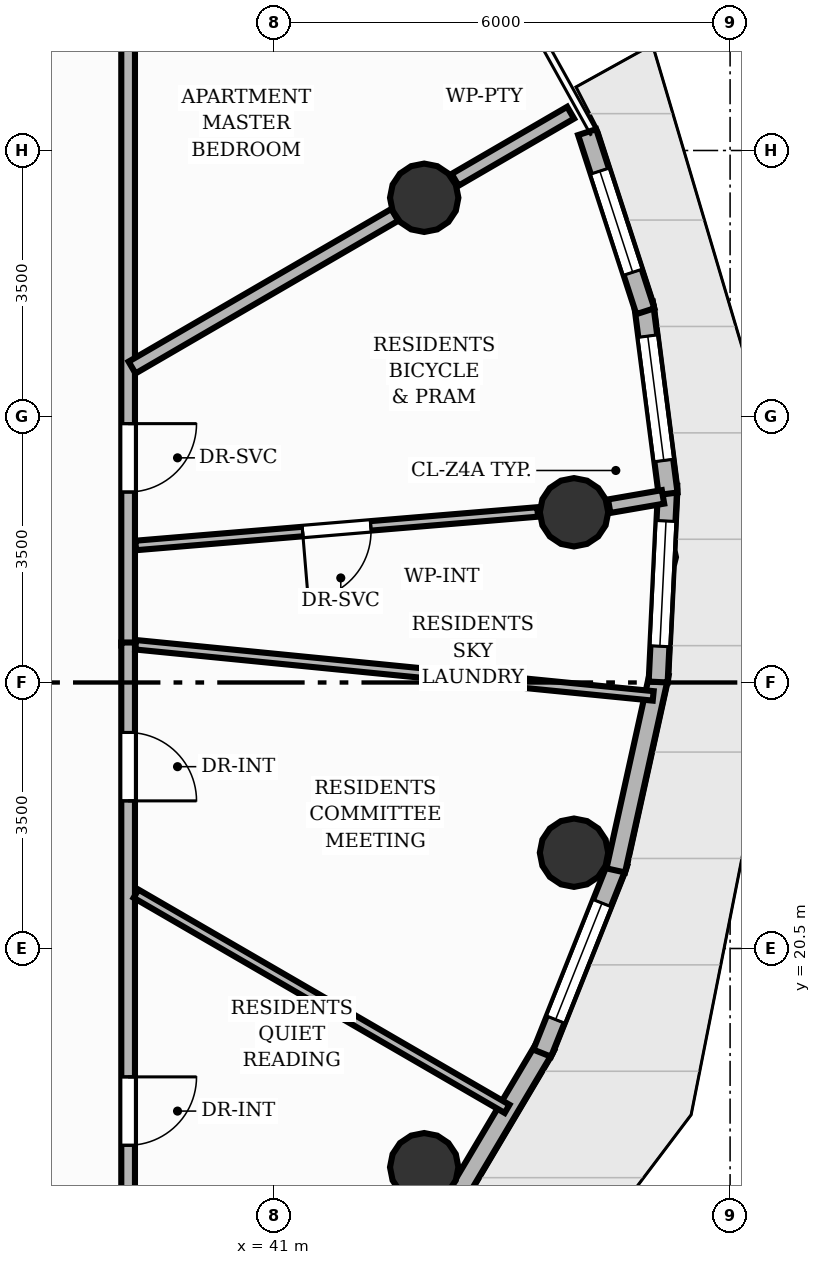
"""IFC4 building model, lengths in metres.
Left out: names, types, materials, properties, quantities, classifications, styles, units other than length and angle.
Written with IfcOpenShell. Run it as: python <this file> out.ifc"""

import sys

from ifc_helpers import new_model, si_unit, direction, frame, frame_2d, origin, origin_2d, place, context, subcontext, project, spatial, rectangle, circle, extrude, element, fill, save


model = new_model("IFC4")
c1 = context("Model", 3, precision=1e-05, world=origin(), true_north=direction((0.0, 1.0)))
c2 = subcontext(c1, "Body", "Model", "MODEL_VIEW")
j1 = project(units=[si_unit("LENGTHUNIT", "METRE"), si_unit("PLANEANGLEUNIT", "RADIAN")], contexts=[c1])
p1 = place(None, origin())
s1 = spatial("IfcSite", under=j1, at=p1, CompositionType="ELEMENT")
p2 = place(p1, origin())
s2 = spatial("IfcBuilding", under=s1, at=p2, CompositionType="ELEMENT")
p3 = place(p2, frame((0.0, 0.0, 188.64)))
s3 = spatial("IfcBuildingStorey", under=s2, at=p3, CompositionType="ELEMENT", Elevation=188.64)
for number, where, z_axis, x_axis in (
    (1, (44.946, 26.24, 0.0), (0.0, 0.0, 1.0), (1.0, 0.0, 0.0)),
    (2, (42.975, 30.378, 0.0), (0.0, 0.0, 1.0), (1.0, 0.0, 0.0)),
    (3, (42.975, 17.622, 0.0), (0.0, 0.0, 1.0), (1.0, 0.0, 0.0)),
    (4, (44.946, 21.76, 0.0), (0.0, 0.0, 1.0), (1.0, 0.0, 0.0)),
):
    element("IfcColumn", number, at=place(p3, frame(where, z_axis=z_axis, x_axis=x_axis)), inside=s3, PredefinedType="COLUMN", context=c2, shape_type="SweptSolid", body=[
        extrude(circle(Radius=0.45, at=origin_2d()), origin(), (0.0, 0.0, 1.0), 3.2),
    ])
p4 = place(p3, frame((44.576, 19.221, 0.0), z_axis=(0.0, 0.0, 1.0), x_axis=(-0.510320389621, -0.859984360287, 0.0)))
e5 = element("IfcWall", 5, at=p4, inside=s3, PredefinedType="SOLIDWALL", context=c2, shape_type="SweptSolid", body=[
    extrude(rectangle(XDim=2.738, YDim=0.25, at=frame_2d((1.369, 0.0))), origin(), (0.0, 0.0, 1.0), 2.96),
])
p5 = place(p3, frame((45.528, 21.633, 0.0), z_axis=(0.0, 0.0, 1.0), x_axis=(-0.370330939431, -0.928899884433, 0.0)))
e6 = element("IfcWall", 6, at=p5, inside=s3, PredefinedType="SOLIDWALL", context=c2, shape_type="SweptSolid", body=[
    extrude(rectangle(XDim=2.702, YDim=0.25, at=frame_2d((1.351, 0.0))), origin(), (0.0, 0.0, 1.0), 2.96),
])
p6 = place(p5, frame((0.576, 0.0, 0.85)))
e7 = element("IfcOpeningElement", 7, at=p6, cuts=e6, PredefinedType="OPENING", context=c2, shape_type="SweptSolid", body=[
    extrude(rectangle(XDim=1.65, YDim=1.55, at=frame_2d((0.825, 0.775))), frame((0.0, 0.135, 0.0), z_axis=(0.0, -1.0, 0.0), x_axis=(1.0, 0.0, 0.0)), (0.0, 0.0, 1.0), 0.27),
])
p7 = place(p3, frame((46.068, 24.116, 0.0), z_axis=(0.0, 0.0, 1.0), x_axis=(-0.215877166516, -0.976420528756, 0.0)))
e8 = element("IfcWall", 8, at=p7, inside=s3, PredefinedType="SOLIDWALL", context=c2, shape_type="SweptSolid", body=[
    extrude(rectangle(XDim=2.651, YDim=0.25, at=frame_2d((1.325, 0.0))), origin(), (0.0, 0.0, 1.0), 2.96),
])
p8 = place(p3, frame((46.18, 26.595, 0.0), z_axis=(0.0, 0.0, 1.0), x_axis=(-0.048688181414, -0.99881402723, 0.0)))
e9 = element("IfcWall", 9, at=p8, inside=s3, PredefinedType="SOLIDWALL", context=c2, shape_type="SweptSolid", body=[
    extrude(rectangle(XDim=2.593, YDim=0.25, at=frame_2d((1.296, 0.0))), origin(), (0.0, 0.0, 1.0), 2.96),
])
p9 = place(p8, frame((0.471, 0.0, 0.85)))
e10 = element("IfcOpeningElement", 10, at=p9, cuts=e9, PredefinedType="OPENING", context=c2, shape_type="SweptSolid", body=[
    extrude(rectangle(XDim=1.65, YDim=1.55, at=frame_2d((0.825, 0.775))), frame((0.0, 0.135, 0.0), z_axis=(0.0, -1.0, 0.0), x_axis=(1.0, 0.0, 0.0)), (0.0, 0.0, 1.0), 0.27),
])
p10 = place(p3, frame((45.86, 28.995, 0.0), z_axis=(0.0, 0.0, 1.0), x_axis=(0.128057007482, -0.991766808698, 0.0)))
e11 = element("IfcWall", 11, at=p10, inside=s3, PredefinedType="SOLIDWALL", context=c2, shape_type="SweptSolid", body=[
    extrude(rectangle(XDim=2.532, YDim=0.25, at=frame_2d((1.266, 0.0))), origin(), (0.0, 0.0, 1.0), 2.96),
])
p11 = place(p10, frame((0.441, 0.0, 0.85)))
e12 = element("IfcOpeningElement", 12, at=p11, cuts=e11, PredefinedType="OPENING", context=c2, shape_type="SweptSolid", body=[
    extrude(rectangle(XDim=1.65, YDim=1.55, at=frame_2d((0.825, 0.775))), frame((0.0, 0.135, 0.0), z_axis=(0.0, -1.0, 0.0), x_axis=(1.0, 0.0, 0.0)), (0.0, 0.0, 1.0), 0.27),
])
p12 = place(p3, frame((45.119, 31.241, 0.0), z_axis=(0.0, 0.0, 1.0), x_axis=(0.309005861828, -0.951060133407, 0.0)))
e13 = element("IfcWall", 13, at=p12, inside=s3, PredefinedType="SOLIDWALL", context=c2, shape_type="SweptSolid", body=[
    extrude(rectangle(XDim=2.478, YDim=0.25, at=frame_2d((1.239, 0.0))), origin(), (0.0, 0.0, 1.0), 2.96),
])
p13 = place(p12, frame((0.539, 0.0, 0.85)))
e14 = element("IfcOpeningElement", 14, at=p13, cuts=e13, PredefinedType="OPENING", context=c2, shape_type="SweptSolid", body=[
    extrude(rectangle(XDim=1.4, YDim=1.55, at=frame_2d((0.7, 0.775))), frame((0.0, 0.135, 0.0), z_axis=(0.0, -1.0, 0.0), x_axis=(1.0, 0.0, 0.0)), (0.0, 0.0, 1.0), 0.27),
])
p14 = place(p3, frame((45.409, 26.32, 0.0), z_axis=(0.0, 0.0, 1.0), x_axis=(0.985336223431, 0.170623933826, 0.0)))
e15 = element("IfcWall", 15, at=p14, inside=s3, PredefinedType="PARTITIONING", context=c2, shape_type="SweptSolid", body=[
    extrude(rectangle(XDim=0.718, YDim=0.18, at=frame_2d((0.359, 0.0))), origin(), (0.0, 0.0, 1.0), 2.404),
])
p15 = place(p3, frame((43.382, 30.614, 0.0), z_axis=(0.0, 0.0, 1.0), x_axis=(0.86461381872, 0.502437005482, 0.0)))
e16 = element("IfcWall", 16, at=p15, inside=s3, PredefinedType="PARTITIONING", context=c2, shape_type="SweptSolid", body=[
    extrude(rectangle(XDim=1.758, YDim=0.18, at=frame_2d((0.879, 0.0))), origin(), (0.0, 0.0, 1.0), 2.404),
])
p16 = place(p3, frame((39.08, 32.58, 0.0), z_axis=(0.0, 0.0, 1.0), x_axis=(0.0, -1.0, 0.0)))
e17 = element("IfcWall", 17, at=p16, inside=s3, PredefinedType="PARTITIONING", context=c2, shape_type="SweptSolid", body=[
    extrude(rectangle(XDim=8.094, YDim=0.18, at=frame_2d((4.047, 0.0))), origin(), (0.0, 0.0, 1.0), 2.955),
])
p17 = place(p16, frame((5.174, 0.0, 0.0)))
e18 = element("IfcOpeningElement", 18, at=p17, cuts=e17, PredefinedType="OPENING", context=c2, shape_type="SweptSolid", body=[
    extrude(rectangle(XDim=0.9, YDim=2.1, at=frame_2d((0.45, 1.05))), frame((0.0, 0.1, 0.0), z_axis=(0.0, -1.0, 0.0), x_axis=(1.0, 0.0, 0.0)), (0.0, 0.0, 1.0), 0.2),
])
p18 = place(p3, frame((39.08, 24.526, 0.0), z_axis=(0.0, 0.0, 1.0), x_axis=(0.0, -1.0, 0.0)))
e19 = element("IfcWall", 19, at=p18, inside=s3, PredefinedType="PARTITIONING", context=c2, shape_type="SweptSolid", body=[
    extrude(rectangle(XDim=9.106, YDim=0.18, at=frame_2d((4.553, 0.0))), origin(), (0.0, 0.0, 1.0), 2.955),
])
p19 = place(p18, frame((1.184, 0.0, 0.0)))
e20 = element("IfcOpeningElement", 20, at=p19, cuts=e19, PredefinedType="OPENING", context=c2, shape_type="SweptSolid", body=[
    extrude(rectangle(XDim=0.9, YDim=2.1, at=frame_2d((0.45, 1.05))), frame((0.0, 0.1, 0.0), z_axis=(0.0, -1.0, 0.0), x_axis=(1.0, 0.0, 0.0)), (0.0, 0.0, 1.0), 0.2),
])
p20 = place(p18, frame((5.716, 0.0, 0.0)))
e21 = element("IfcOpeningElement", 21, at=p20, cuts=e19, PredefinedType="OPENING", context=c2, shape_type="SweptSolid", body=[
    extrude(rectangle(XDim=0.9, YDim=2.1, at=frame_2d((0.45, 1.05))), frame((0.0, 0.1, 0.0), z_axis=(0.0, -1.0, 0.0), x_axis=(1.0, 0.0, 0.0)), (0.0, 0.0, 1.0), 0.2),
])
p21 = place(p3, frame((44.468, 26.244, 0.0), z_axis=(0.0, 0.0, 1.0), x_axis=(-0.996538774807, -0.083129238578, 0.0)))
e22 = element("IfcWall", 22, at=p21, inside=s3, PredefinedType="PARTITIONING", context=c2, shape_type="SweptSolid", body=[
    extrude(rectangle(XDim=5.307, YDim=0.125, at=frame_2d((2.653, 0.0))), origin(), (0.0, 0.0, 1.0), 2.404),
])
p22 = place(p21, frame((2.204, 0.0, 0.0)))
e23 = element("IfcOpeningElement", 23, at=p22, cuts=e22, PredefinedType="OPENING", context=c2, shape_type="SweptSolid", body=[
    extrude(rectangle(XDim=0.9, YDim=2.1, at=frame_2d((0.45, 1.05))), frame((0.0, 0.073, 0.0), z_axis=(0.0, -1.0, 0.0), x_axis=(1.0, 0.0, 0.0)), (0.0, 0.0, 1.0), 0.145),
])
p23 = place(p3, frame((39.132, 28.144, 0.0), z_axis=(0.0, 0.0, 1.0), x_axis=(0.864597268714, 0.502465484319, 0.0)))
e24 = element("IfcWall", 24, at=p23, inside=s3, PredefinedType="PARTITIONING", context=c2, shape_type="SweptSolid", body=[
    extrude(rectangle(XDim=3.998, YDim=0.18, at=frame_2d((1.999, 0.0))), origin(), (0.0, 0.0, 1.0), 2.404),
])
p24 = place(p3, frame((44.066, 18.39, 0.0), z_axis=(0.0, 0.0, 1.0), x_axis=(-0.865092390625, 0.501612555348, 0.0)))
e25 = element("IfcWall", 25, at=p24, inside=s3, PredefinedType="PARTITIONING", context=c2, shape_type="SweptSolid", body=[
    extrude(rectangle(XDim=5.643, YDim=0.125, at=frame_2d((2.822, 0.0))), origin(), (0.0, 0.0, 1.0), 2.692),
])
p25 = place(p3, frame((39.179, 24.497, 0.0), z_axis=(0.0, 0.0, 1.0), x_axis=(0.995152744832, -0.098341316102, 0.0)))
e26 = element("IfcWall", 26, at=p25, inside=s3, PredefinedType="PARTITIONING", context=c2, shape_type="SweptSolid", body=[
    extrude(rectangle(XDim=6.842, YDim=0.125, at=frame_2d((3.421, 0.0))), origin(), (0.0, 0.0, 1.0), 2.692),
])
p26 = place(p6, origin())
e27 = element("IfcWindow", 27, at=p26, inside=s3, PartitioningType="SINGLE_PANEL", PredefinedType="WINDOW", context=c2, shape_type="SweptSolid", body=[
    extrude(rectangle(XDim=1.65, YDim=1.55, at=frame_2d((0.825, 0.775))), frame((0.0, 0.03, 0.0), z_axis=(0.0, -1.0, 0.0), x_axis=(1.0, 0.0, 0.0)), (0.0, 0.0, 1.0), 0.06),
])
fill(e7, e27)
p27 = place(p9, origin())
e28 = element("IfcWindow", 28, at=p27, inside=s3, PartitioningType="SINGLE_PANEL", PredefinedType="WINDOW", context=c2, shape_type="SweptSolid", body=[
    extrude(rectangle(XDim=1.65, YDim=1.55, at=frame_2d((0.825, 0.775))), frame((0.0, 0.03, 0.0), z_axis=(0.0, -1.0, 0.0), x_axis=(1.0, 0.0, 0.0)), (0.0, 0.0, 1.0), 0.06),
])
fill(e10, e28)
p28 = place(p11, origin())
e29 = element("IfcWindow", 29, at=p28, inside=s3, PartitioningType="SINGLE_PANEL", PredefinedType="WINDOW", context=c2, shape_type="SweptSolid", body=[
    extrude(rectangle(XDim=1.65, YDim=1.55, at=frame_2d((0.825, 0.775))), frame((0.0, 0.03, 0.0), z_axis=(0.0, -1.0, 0.0), x_axis=(1.0, 0.0, 0.0)), (0.0, 0.0, 1.0), 0.06),
])
fill(e12, e29)
p29 = place(p13, origin())
e30 = element("IfcWindow", 30, at=p29, inside=s3, PartitioningType="SINGLE_PANEL", PredefinedType="WINDOW", context=c2, shape_type="SweptSolid", body=[
    extrude(rectangle(XDim=1.4, YDim=1.55, at=frame_2d((0.7, 0.775))), frame((0.0, 0.03, 0.0), z_axis=(0.0, -1.0, 0.0), x_axis=(1.0, 0.0, 0.0)), (0.0, 0.0, 1.0), 0.06),
])
fill(e14, e30)
p30 = place(p17, origin())
e31 = element("IfcDoor", 31, at=p30, inside=s3, OperationType="SINGLE_SWING_LEFT", PredefinedType="DOOR", context=c2, shape_type="SweptSolid", body=[
    extrude(rectangle(XDim=0.9, YDim=2.1, at=frame_2d((0.45, 1.05))), frame((0.0, 0.025, 0.0), z_axis=(0.0, -1.0, 0.0), x_axis=(1.0, 0.0, 0.0)), (0.0, 0.0, 1.0), 0.05),
])
fill(e18, e31)
p31 = place(p19, origin())
e32 = element("IfcDoor", 32, at=p31, inside=s3, OperationType="SINGLE_SWING_RIGHT", PredefinedType="DOOR", context=c2, shape_type="SweptSolid", body=[
    extrude(rectangle(XDim=0.9, YDim=2.1, at=frame_2d((0.45, 1.05))), frame((0.0, 0.025, 0.0), z_axis=(0.0, -1.0, 0.0), x_axis=(1.0, 0.0, 0.0)), (0.0, 0.0, 1.0), 0.05),
])
fill(e20, e32)
p32 = place(p20, origin())
e33 = element("IfcDoor", 33, at=p32, inside=s3, OperationType="SINGLE_SWING_LEFT", PredefinedType="DOOR", context=c2, shape_type="SweptSolid", body=[
    extrude(rectangle(XDim=0.9, YDim=2.1, at=frame_2d((0.45, 1.05))), frame((0.0, 0.025, 0.0), z_axis=(0.0, -1.0, 0.0), x_axis=(1.0, 0.0, 0.0)), (0.0, 0.0, 1.0), 0.05),
])
fill(e21, e33)
p33 = place(p22, origin())
e34 = element("IfcDoor", 34, at=p33, inside=s3, OperationType="SINGLE_SWING_RIGHT", PredefinedType="DOOR", context=c2, shape_type="SweptSolid", body=[
    extrude(rectangle(XDim=0.9, YDim=2.1, at=frame_2d((0.45, 1.05))), frame((0.0, 0.025, 0.0), z_axis=(0.0, -1.0, 0.0), x_axis=(1.0, 0.0, 0.0)), (0.0, 0.0, 1.0), 0.05),
])
fill(e23, e34)
save(model, sys.argv[1])
